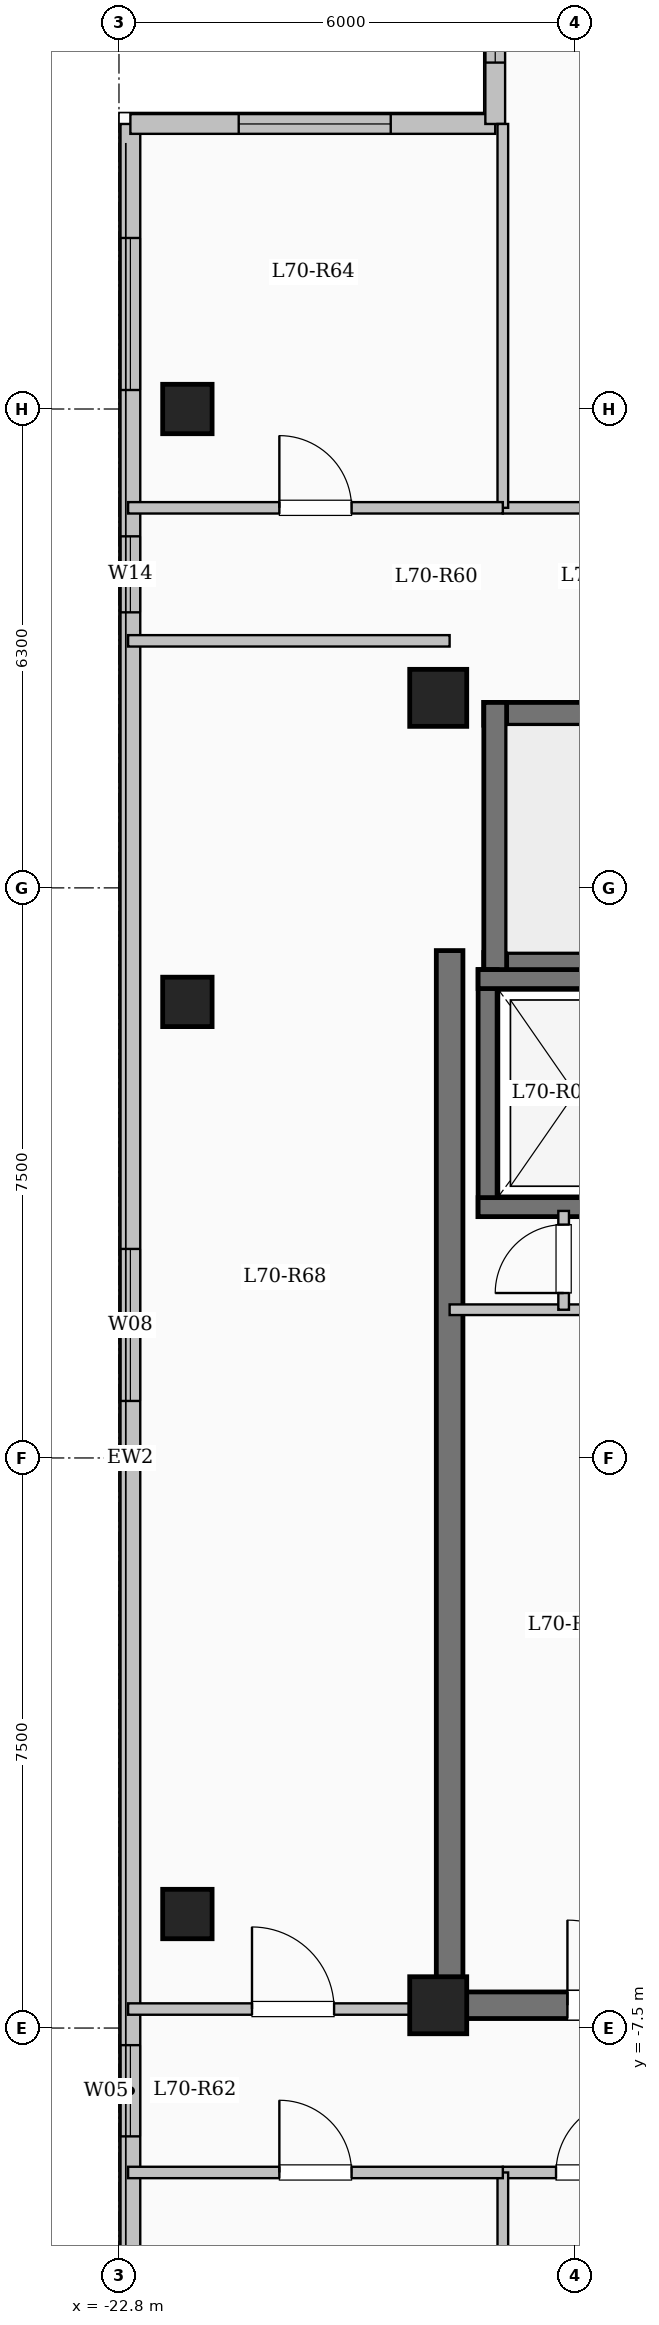
"""IFC4 building model, lengths in metres.
Left out: names, types, materials, properties, quantities, classifications, styles, units other than length and angle.
Written with IfcOpenShell. Run it as: python <this file> out.ifc"""

import sys

from ifc_helpers import new_model, si_unit, direction, frame, frame_2d, origin, origin_2d, place, context, subcontext, project, spatial, rectangle, extrude, element, fill, save


model = new_model("IFC4")
c1 = context("Model", 3, precision=1e-05, world=origin(), true_north=direction((0.0, 1.0)))
c2 = subcontext(c1, "Body", "Model", "MODEL_VIEW")
j1 = project(units=[si_unit("LENGTHUNIT", "METRE"), si_unit("PLANEANGLEUNIT", "RADIAN")], contexts=[c1])
p1 = place(None, origin())
s1 = spatial("IfcSite", under=j1, at=p1, CompositionType="ELEMENT")
p2 = place(p1, origin())
s2 = spatial("IfcBuilding", under=s1, at=p2, CompositionType="ELEMENT")
p3 = place(p2, frame((0.0, 0.0, 258.25)))
s3 = spatial("IfcBuildingStorey", under=s2, at=p3, CompositionType="ELEMENT", Elevation=258.25)
for number, where, z_axis, x_axis in (
    (1, (-18.6, -7.2, 0.0), (0.0, 0.0, 1.0), (1.0, 0.0, 0.0)),
    (2, (-18.6, 10.0, 0.0), (0.0, 0.0, 1.0), (1.0, 0.0, 0.0)),
):
    element("IfcColumn", number, at=place(p3, frame(where, z_axis=z_axis, x_axis=x_axis)), inside=s3, PredefinedType="COLUMN", context=c2, shape_type="SweptSolid", body=[
        extrude(rectangle(XDim=0.75, YDim=0.75, at=origin_2d()), origin(), (0.0, 0.0, 1.0), 3.35),
    ])
for number, where, z_axis, x_axis in (
    (3, (-21.9, -6.0, 0.0), (0.0, 0.0, 1.0), (1.0, 0.0, 0.0)),
    (4, (-21.9, 6.0, 0.0), (0.0, 0.0, 1.0), (1.0, 0.0, 0.0)),
    (5, (-21.9, 13.8, 0.0), (0.0, 0.0, 1.0), (1.0, 0.0, 0.0)),
):
    element("IfcColumn", number, at=place(p3, frame(where, z_axis=z_axis, x_axis=x_axis)), inside=s3, PredefinedType="COLUMN", context=c2, shape_type="SweptSolid", body=[
        extrude(rectangle(XDim=0.65, YDim=0.65, at=origin_2d()), origin(), (0.0, 0.0, 1.0), 3.35),
    ])
p4 = place(p3, frame((-22.65, -17.55, 0.0), z_axis=(0.0, 0.0, 1.0), x_axis=(0.0, 1.0, 0.0)))
e6 = element("IfcWall", 6, at=p4, inside=s3, PredefinedType="SOLIDWALL", context=c2, shape_type="SweptSolid", body=[
    extrude(rectangle(XDim=35.1, YDim=0.26, at=frame_2d((17.55, 0.0))), origin(), (0.0, 0.0, 1.0), 3.1),
])
p5 = place(p4, frame((2.975, 0.0, 0.9)))
e7 = element("IfcOpeningElement", 7, at=p5, cuts=e6, PredefinedType="OPENING", context=c2, shape_type="SweptSolid", body=[
    extrude(rectangle(XDim=2.2, YDim=1.75, at=frame_2d((1.1, 0.875))), frame((0.0, 0.14, 0.0), z_axis=(0.0, -1.0, 0.0), x_axis=(1.0, 0.0, 0.0)), (0.0, 0.0, 1.0), 0.28),
])
p6 = place(p4, frame((8.625, 0.0, 0.95)))
e8 = element("IfcOpeningElement", 8, at=p6, cuts=e6, PredefinedType="OPENING", context=c2, shape_type="SweptSolid", body=[
    extrude(rectangle(XDim=1.2, YDim=1.5, at=frame_2d((0.6, 0.75))), frame((0.0, 0.14, 0.0), z_axis=(0.0, -1.0, 0.0), x_axis=(1.0, 0.0, 0.0)), (0.0, 0.0, 1.0), 0.28),
])
p7 = place(p4, frame((18.3, 0.0, 0.9)))
e9 = element("IfcOpeningElement", 9, at=p7, cuts=e6, PredefinedType="OPENING", context=c2, shape_type="SweptSolid", body=[
    extrude(rectangle(XDim=2.0, YDim=1.7, at=frame_2d((1.0, 0.85))), frame((0.0, 0.14, 0.0), z_axis=(0.0, -1.0, 0.0), x_axis=(1.0, 0.0, 0.0)), (0.0, 0.0, 1.0), 0.28),
])
p8 = place(p4, frame((28.675, 0.0, 0.95)))
e10 = element("IfcOpeningElement", 10, at=p8, cuts=e6, PredefinedType="OPENING", context=c2, shape_type="SweptSolid", body=[
    extrude(rectangle(XDim=1.0, YDim=1.5, at=frame_2d((0.5, 0.75))), frame((0.0, 0.14, 0.0), z_axis=(0.0, -1.0, 0.0), x_axis=(1.0, 0.0, 0.0)), (0.0, 0.0, 1.0), 0.28),
])
p9 = place(p4, frame((31.6, 0.0, 0.9)))
e11 = element("IfcOpeningElement", 11, at=p9, cuts=e6, PredefinedType="OPENING", context=c2, shape_type="SweptSolid", body=[
    extrude(rectangle(XDim=2.0, YDim=1.7, at=frame_2d((1.0, 0.85))), frame((0.0, 0.14, 0.0), z_axis=(0.0, -1.0, 0.0), x_axis=(1.0, 0.0, 0.0)), (0.0, 0.0, 1.0), 0.28),
])
p10 = place(p3, frame((-22.65, 17.55, 0.0), z_axis=(0.0, 0.0, 1.0), x_axis=(1.0, 0.0, 0.0)))
e12 = element("IfcWall", 12, at=p10, inside=s3, PredefinedType="SOLIDWALL", context=c2, shape_type="SweptSolid", body=[
    extrude(rectangle(XDim=4.8, YDim=0.26, at=frame_2d((2.4, 0.0))), origin(), (0.0, 0.0, 1.0), 3.1),
])
p11 = place(p10, frame((1.425, 0.0, 0.9)))
e13 = element("IfcOpeningElement", 13, at=p11, cuts=e12, PredefinedType="OPENING", context=c2, shape_type="SweptSolid", body=[
    extrude(rectangle(XDim=2.0, YDim=1.7, at=frame_2d((1.0, 0.85))), frame((0.0, 0.14, 0.0), z_axis=(0.0, -1.0, 0.0), x_axis=(1.0, 0.0, 0.0)), (0.0, 0.0, 1.0), 0.28),
])
p12 = place(p3, frame((-17.85, 17.55, 0.0), z_axis=(0.0, 0.0, 1.0), x_axis=(0.0, 1.0, 0.0)))
e14 = element("IfcWall", 14, at=p12, inside=s3, PredefinedType="SOLIDWALL", context=c2, shape_type="SweptSolid", body=[
    extrude(rectangle(XDim=3.3, YDim=0.26, at=frame_2d((1.65, 0.0))), origin(), (0.0, 0.0, 1.0), 3.1),
])
p13 = place(p12, frame((0.808, 0.0, 0.9)))
e15 = element("IfcOpeningElement", 15, at=p13, cuts=e14, PredefinedType="OPENING", context=c2, shape_type="SweptSolid", body=[
    extrude(rectangle(XDim=1.65, YDim=1.6, at=frame_2d((0.825, 0.8))), frame((0.0, 0.14, 0.0), z_axis=(0.0, -1.0, 0.0), x_axis=(1.0, 0.0, 0.0)), (0.0, 0.0, 1.0), 0.28),
])
p14 = place(p3, frame((-18.0, 9.79, 0.0), z_axis=(0.0, 0.0, 1.0), x_axis=(1.0, 0.0, 0.0)))
e16 = element("IfcWall", 16, at=p14, inside=s3, PredefinedType="SHEAR", context=c2, shape_type="SweptSolid", body=[
    extrude(rectangle(XDim=8.0, YDim=0.3, at=frame_2d((4.0, 0.0))), origin(), (0.0, 0.0, 1.0), 3.35),
])
p15 = place(p3, frame((-18.0, 6.5, 0.0), z_axis=(0.0, 0.0, 1.0), x_axis=(1.0, 0.0, 0.0)))
e17 = element("IfcWall", 17, at=p15, inside=s3, PredefinedType="SHEAR", context=c2, shape_type="SweptSolid", body=[
    extrude(rectangle(XDim=8.0, YDim=0.3, at=frame_2d((4.0, 0.0))), origin(), (0.0, 0.0, 1.0), 3.35),
])
p16 = place(p15, frame((6.45, 0.0, 0.0)))
e18 = element("IfcOpeningElement", 18, at=p16, cuts=e17, PredefinedType="OPENING", context=c2, shape_type="SweptSolid", body=[
    extrude(rectangle(XDim=1.0, YDim=2.15, at=frame_2d((0.5, 1.075))), frame((0.0, 0.16, 0.0), z_axis=(0.0, -1.0, 0.0), x_axis=(1.0, 0.0, 0.0)), (0.0, 0.0, 1.0), 0.32),
])
p17 = place(p3, frame((-17.85, 6.35, 0.0), z_axis=(0.0, 0.0, 1.0), x_axis=(0.0, 1.0, 0.0)))
e19 = element("IfcWall", 19, at=p17, inside=s3, PredefinedType="SHEAR", context=c2, shape_type="SweptSolid", body=[
    extrude(rectangle(XDim=3.59, YDim=0.3, at=frame_2d((1.795, 0.0))), origin(), (0.0, 0.0, 1.0), 3.35),
])
p18 = place(p3, frame((-17.95, 3.175, 0.0), z_axis=(0.0, 0.0, 1.0), x_axis=(0.0, 1.0, 0.0)))
e20 = element("IfcWall", 20, at=p18, inside=s3, PredefinedType="SHEAR", context=c2, shape_type="SweptSolid", body=[
    extrude(rectangle(XDim=3.25, YDim=0.25, at=frame_2d((1.625, 0.0))), origin(), (0.0, 0.0, 1.0), 3.35),
])
for number, where, z_axis, x_axis in (
    (21, (-18.075, 3.3, 0.0), (0.0, 0.0, 1.0), (1.0, 0.0, 0.0)),
    (22, (-18.075, 6.3, 0.0), (0.0, 0.0, 1.0), (1.0, 0.0, 0.0)),
):
    element("IfcWall", number, at=place(p3, frame(where, z_axis=z_axis, x_axis=x_axis)), inside=s3, PredefinedType="SHEAR", context=c2, shape_type="SweptSolid", body=[
        extrude(rectangle(XDim=2.55, YDim=0.25, at=frame_2d((1.275, 0.0))), origin(), (0.0, 0.0, 1.0), 3.35),
    ])
p19 = place(p3, frame((-18.45, -7.375, 0.0), z_axis=(0.0, 0.0, 1.0), x_axis=(0.0, 1.0, 0.0)))
e23 = element("IfcWall", 23, at=p19, inside=s3, PredefinedType="SHEAR", context=c2, shape_type="SweptSolid", body=[
    extrude(rectangle(XDim=14.05, YDim=0.35, at=frame_2d((7.025, 0.0))), origin(), (0.0, 0.0, 1.0), 3.35),
])
p20 = place(p3, frame((-18.625, -7.2, 0.0), z_axis=(0.0, 0.0, 1.0), x_axis=(1.0, 0.0, 0.0)))
e24 = element("IfcWall", 24, at=p20, inside=s3, PredefinedType="SHEAR", context=c2, shape_type="SweptSolid", body=[
    extrude(rectangle(XDim=8.55, YDim=0.35, at=frame_2d((4.275, 0.0))), origin(), (0.0, 0.0, 1.0), 3.35),
])
p21 = place(p20, frame((1.725, 0.0, 0.0)))
e25 = element("IfcOpeningElement", 25, at=p21, cuts=e24, PredefinedType="OPENING", context=c2, shape_type="SweptSolid", body=[
    extrude(rectangle(XDim=1.12, YDim=2.15, at=frame_2d((0.56, 1.075))), frame((0.0, 0.185, 0.0), z_axis=(0.0, -1.0, 0.0), x_axis=(1.0, 0.0, 0.0)), (0.0, 0.0, 1.0), 0.37),
])
p22 = place(p3, frame((-18.45, 1.95, 0.0), z_axis=(0.0, 0.0, 1.0), x_axis=(1.0, 0.0, 0.0)))
e26 = element("IfcWall", 26, at=p22, inside=s3, PredefinedType="PARTITIONING", context=c2, shape_type="SweptSolid", body=[
    extrude(rectangle(XDim=3.15, YDim=0.14, at=frame_2d((1.575, 0.0))), origin(), (0.0, 0.0, 1.0), 3.1),
])
p23 = place(p22, frame((1.9, 0.0, 0.0)))
e27 = element("IfcOpeningElement", 27, at=p23, cuts=e26, PredefinedType="OPENING", context=c2, shape_type="SweptSolid", body=[
    extrude(rectangle(XDim=0.9, YDim=2.08, at=frame_2d((0.45, 1.04))), frame((0.0, 0.08, 0.0), z_axis=(0.0, -1.0, 0.0), x_axis=(1.0, 0.0, 0.0)), (0.0, 0.0, 1.0), 0.16),
])
p24 = place(p3, frame((-16.95, 1.95, 0.0), z_axis=(0.0, 0.0, 1.0), x_axis=(0.0, 1.0, 0.0)))
e28 = element("IfcWall", 28, at=p24, inside=s3, PredefinedType="PARTITIONING", context=c2, shape_type="SweptSolid", body=[
    extrude(rectangle(XDim=1.3, YDim=0.14, at=frame_2d((0.65, 0.0))), origin(), (0.0, 0.0, 1.0), 3.1),
])
p25 = place(p24, frame((0.22, 0.0, 0.0)))
e29 = element("IfcOpeningElement", 29, at=p25, cuts=e28, PredefinedType="OPENING", context=c2, shape_type="SweptSolid", body=[
    extrude(rectangle(XDim=0.9, YDim=2.08, at=frame_2d((0.45, 1.04))), frame((0.0, 0.08, 0.0), z_axis=(0.0, -1.0, 0.0), x_axis=(1.0, 0.0, 0.0)), (0.0, 0.0, 1.0), 0.16),
])
p26 = place(p3, frame((-17.75, 12.5, 0.0), z_axis=(0.0, 0.0, 1.0), x_axis=(1.0, 0.0, 0.0)))
e30 = element("IfcWall", 30, at=p26, inside=s3, PredefinedType="PARTITIONING", context=c2, shape_type="SweptSolid", body=[
    extrude(rectangle(XDim=13.9, YDim=0.15, at=frame_2d((6.95, 0.0))), origin(), (0.0, 0.0, 1.0), 3.1),
])
p27 = place(p26, frame((1.968, 0.0, 0.0)))
e31 = element("IfcOpeningElement", 31, at=p27, cuts=e30, PredefinedType="OPENING", context=c2, shape_type="SweptSolid", body=[
    extrude(rectangle(XDim=0.95, YDim=2.15, at=frame_2d((0.475, 1.075))), frame((0.0, 0.085, 0.0), z_axis=(0.0, -1.0, 0.0), x_axis=(1.0, 0.0, 0.0)), (0.0, 0.0, 1.0), 0.17),
])
p28 = place(p26, frame((6.944, 0.0, 0.0)))
e32 = element("IfcOpeningElement", 32, at=p28, cuts=e30, PredefinedType="OPENING", context=c2, shape_type="SweptSolid", body=[
    extrude(rectangle(XDim=0.95, YDim=2.15, at=frame_2d((0.475, 1.075))), frame((0.0, 0.085, 0.0), z_axis=(0.0, -1.0, 0.0), x_axis=(1.0, 0.0, 0.0)), (0.0, 0.0, 1.0), 0.17),
])
p29 = place(p26, frame((11.371, 0.0, 0.0)))
e33 = element("IfcOpeningElement", 33, at=p29, cuts=e30, PredefinedType="OPENING", context=c2, shape_type="SweptSolid", body=[
    extrude(rectangle(XDim=0.95, YDim=2.15, at=frame_2d((0.475, 1.075))), frame((0.0, 0.085, 0.0), z_axis=(0.0, -1.0, 0.0), x_axis=(1.0, 0.0, 0.0)), (0.0, 0.0, 1.0), 0.17),
])
p30 = place(p3, frame((-17.75, -9.4, 0.0), z_axis=(0.0, 0.0, 1.0), x_axis=(1.0, 0.0, 0.0)))
e34 = element("IfcWall", 34, at=p30, inside=s3, PredefinedType="PARTITIONING", context=c2, shape_type="SweptSolid", body=[
    extrude(rectangle(XDim=9.2, YDim=0.15, at=frame_2d((4.6, 0.0))), origin(), (0.0, 0.0, 1.0), 3.1),
])
p31 = place(p30, frame((0.7, 0.0, 0.0)))
e35 = element("IfcOpeningElement", 35, at=p31, cuts=e34, PredefinedType="OPENING", context=c2, shape_type="SweptSolid", body=[
    extrude(rectangle(XDim=0.96, YDim=2.15, at=frame_2d((0.48, 1.075))), frame((0.0, 0.085, 0.0), z_axis=(0.0, -1.0, 0.0), x_axis=(1.0, 0.0, 0.0)), (0.0, 0.0, 1.0), 0.17),
])
p32 = place(p30, frame((5.275, 0.0, 0.0)))
e36 = element("IfcOpeningElement", 36, at=p32, cuts=e34, PredefinedType="OPENING", context=c2, shape_type="SweptSolid", body=[
    extrude(rectangle(XDim=0.96, YDim=2.15, at=frame_2d((0.48, 1.075))), frame((0.0, 0.085, 0.0), z_axis=(0.0, -1.0, 0.0), x_axis=(1.0, 0.0, 0.0)), (0.0, 0.0, 1.0), 0.17),
])
p33 = place(p3, frame((-22.68, -7.25, 0.0), z_axis=(0.0, 0.0, 1.0), x_axis=(1.0, 0.0, 0.0)))
e37 = element("IfcWall", 37, at=p33, inside=s3, PredefinedType="PARTITIONING", context=c2, shape_type="SweptSolid", body=[
    extrude(rectangle(XDim=4.23, YDim=0.15, at=frame_2d((2.115, 0.0))), origin(), (0.0, 0.0, 1.0), 3.1),
])
p34 = place(p33, frame((1.63, 0.0, 0.0)))
e38 = element("IfcOpeningElement", 38, at=p34, cuts=e37, PredefinedType="OPENING", context=c2, shape_type="SweptSolid", body=[
    extrude(rectangle(XDim=1.08, YDim=2.15, at=frame_2d((0.54, 1.075))), frame((0.0, 0.085, 0.0), z_axis=(0.0, -1.0, 0.0), x_axis=(1.0, 0.0, 0.0)), (0.0, 0.0, 1.0), 0.17),
])
p35 = place(p3, frame((-22.68, 10.75, 0.0), z_axis=(0.0, 0.0, 1.0), x_axis=(1.0, 0.0, 0.0)))
e39 = element("IfcWall", 39, at=p35, inside=s3, PredefinedType="PARTITIONING", context=c2, shape_type="SweptSolid", body=[
    extrude(rectangle(XDim=4.23, YDim=0.15, at=frame_2d((2.115, 0.0))), origin(), (0.0, 0.0, 1.0), 3.1),
])
p36 = place(p3, frame((-17.75, -17.55, 0.0), z_axis=(0.0, 0.0, 1.0), x_axis=(0.0, 1.0, 0.0)))
e40 = element("IfcWall", 40, at=p36, inside=s3, PredefinedType="PARTITIONING", context=c2, shape_type="SweptSolid", body=[
    extrude(rectangle(XDim=8.15, YDim=0.14, at=frame_2d((4.075, 0.0))), origin(), (0.0, 0.0, 1.0), 3.1),
])
p37 = place(p3, frame((-17.75, 12.5, 0.0), z_axis=(0.0, 0.0, 1.0), x_axis=(0.0, 1.0, 0.0)))
e41 = element("IfcWall", 41, at=p37, inside=s3, PredefinedType="PARTITIONING", context=c2, shape_type="SweptSolid", body=[
    extrude(rectangle(XDim=5.05, YDim=0.14, at=frame_2d((2.525, 0.0))), origin(), (0.0, 0.0, 1.0), 3.1),
])
p38 = place(p3, frame((-22.68, 12.5, 0.0), z_axis=(0.0, 0.0, 1.0), x_axis=(1.0, 0.0, 0.0)))
e42 = element("IfcWall", 42, at=p38, inside=s3, PredefinedType="PARTITIONING", context=c2, shape_type="SweptSolid", body=[
    extrude(rectangle(XDim=4.93, YDim=0.15, at=frame_2d((2.465, 0.0))), origin(), (0.0, 0.0, 1.0), 3.1),
])
p39 = place(p38, frame((1.99, 0.0, 0.0)))
e43 = element("IfcOpeningElement", 43, at=p39, cuts=e42, PredefinedType="OPENING", context=c2, shape_type="SweptSolid", body=[
    extrude(rectangle(XDim=0.95, YDim=2.15, at=frame_2d((0.475, 1.075))), frame((0.0, 0.085, 0.0), z_axis=(0.0, -1.0, 0.0), x_axis=(1.0, 0.0, 0.0)), (0.0, 0.0, 1.0), 0.17),
])
p40 = place(p3, frame((-22.68, -9.4, 0.0), z_axis=(0.0, 0.0, 1.0), x_axis=(1.0, 0.0, 0.0)))
e44 = element("IfcWall", 44, at=p40, inside=s3, PredefinedType="PARTITIONING", context=c2, shape_type="SweptSolid", body=[
    extrude(rectangle(XDim=4.93, YDim=0.15, at=frame_2d((2.465, 0.0))), origin(), (0.0, 0.0, 1.0), 3.1),
])
p41 = place(p40, frame((1.99, 0.0, 0.0)))
e45 = element("IfcOpeningElement", 45, at=p41, cuts=e44, PredefinedType="OPENING", context=c2, shape_type="SweptSolid", body=[
    extrude(rectangle(XDim=0.95, YDim=2.15, at=frame_2d((0.475, 1.075))), frame((0.0, 0.085, 0.0), z_axis=(0.0, -1.0, 0.0), x_axis=(1.0, 0.0, 0.0)), (0.0, 0.0, 1.0), 0.17),
])
p42 = place(p6, origin())
e46 = element("IfcWindow", 46, at=p42, inside=s3, PartitioningType="SINGLE_PANEL", PredefinedType="WINDOW", context=c2, shape_type="SweptSolid", body=[
    extrude(rectangle(XDim=1.2, YDim=1.5, at=frame_2d((0.6, 0.75))), frame((0.0, 0.03, 0.0), z_axis=(0.0, -1.0, 0.0), x_axis=(1.0, 0.0, 0.0)), (0.0, 0.0, 1.0), 0.06),
])
fill(e8, e46)
p43 = place(p7, origin())
e47 = element("IfcWindow", 47, at=p43, inside=s3, PartitioningType="SINGLE_PANEL", PredefinedType="WINDOW", context=c2, shape_type="SweptSolid", body=[
    extrude(rectangle(XDim=2.0, YDim=1.7, at=frame_2d((1.0, 0.85))), frame((0.0, 0.03, 0.0), z_axis=(0.0, -1.0, 0.0), x_axis=(1.0, 0.0, 0.0)), (0.0, 0.0, 1.0), 0.06),
])
fill(e9, e47)
p44 = place(p8, origin())
e48 = element("IfcWindow", 48, at=p44, inside=s3, PartitioningType="SINGLE_PANEL", PredefinedType="WINDOW", context=c2, shape_type="SweptSolid", body=[
    extrude(rectangle(XDim=1.0, YDim=1.5, at=frame_2d((0.5, 0.75))), frame((0.0, 0.03, 0.0), z_axis=(0.0, -1.0, 0.0), x_axis=(1.0, 0.0, 0.0)), (0.0, 0.0, 1.0), 0.06),
])
fill(e10, e48)
p45 = place(p9, origin())
e49 = element("IfcWindow", 49, at=p45, inside=s3, PartitioningType="SINGLE_PANEL", PredefinedType="WINDOW", context=c2, shape_type="SweptSolid", body=[
    extrude(rectangle(XDim=2.0, YDim=1.7, at=frame_2d((1.0, 0.85))), frame((0.0, 0.03, 0.0), z_axis=(0.0, -1.0, 0.0), x_axis=(1.0, 0.0, 0.0)), (0.0, 0.0, 1.0), 0.06),
])
fill(e11, e49)
p46 = place(p11, origin())
e50 = element("IfcWindow", 50, at=p46, inside=s3, PartitioningType="SINGLE_PANEL", PredefinedType="WINDOW", context=c2, shape_type="SweptSolid", body=[
    extrude(rectangle(XDim=2.0, YDim=1.7, at=frame_2d((1.0, 0.85))), frame((0.0, 0.03, 0.0), z_axis=(0.0, -1.0, 0.0), x_axis=(1.0, 0.0, 0.0)), (0.0, 0.0, 1.0), 0.06),
])
fill(e13, e50)
p47 = place(p13, origin())
e51 = element("IfcWindow", 51, at=p47, inside=s3, PartitioningType="SINGLE_PANEL", PredefinedType="WINDOW", context=c2, shape_type="SweptSolid", body=[
    extrude(rectangle(XDim=1.65, YDim=1.6, at=frame_2d((0.825, 0.8))), frame((0.0, 0.03, 0.0), z_axis=(0.0, -1.0, 0.0), x_axis=(1.0, 0.0, 0.0)), (0.0, 0.0, 1.0), 0.06),
])
fill(e15, e51)
p48 = place(p21, origin())
e52 = element("IfcDoor", 52, at=p48, inside=s3, OperationType="SINGLE_SWING_LEFT", PredefinedType="DOOR", context=c2, shape_type="SweptSolid", body=[
    extrude(rectangle(XDim=1.12, YDim=2.15, at=frame_2d((0.56, 1.075))), frame((0.0, 0.025, 0.0), z_axis=(0.0, -1.0, 0.0), x_axis=(1.0, 0.0, 0.0)), (0.0, 0.0, 1.0), 0.05),
])
fill(e25, e52)
p49 = place(p25, origin())
e53 = element("IfcDoor", 53, at=p49, inside=s3, OperationType="SINGLE_SWING_LEFT", PredefinedType="DOOR", context=c2, shape_type="SweptSolid", body=[
    extrude(rectangle(XDim=0.9, YDim=2.08, at=frame_2d((0.45, 1.04))), frame((0.0, 0.025, 0.0), z_axis=(0.0, -1.0, 0.0), x_axis=(1.0, 0.0, 0.0)), (0.0, 0.0, 1.0), 0.05),
])
fill(e29, e53)
p50 = place(p31, origin())
e54 = element("IfcDoor", 54, at=p50, inside=s3, OperationType="SINGLE_SWING_RIGHT", PredefinedType="DOOR", context=c2, shape_type="SweptSolid", body=[
    extrude(rectangle(XDim=0.96, YDim=2.15, at=frame_2d((0.48, 1.075))), frame((0.0, 0.025, 0.0), z_axis=(0.0, -1.0, 0.0), x_axis=(1.0, 0.0, 0.0)), (0.0, 0.0, 1.0), 0.05),
])
fill(e35, e54)
p51 = place(p39, origin())
e55 = element("IfcDoor", 55, at=p51, inside=s3, OperationType="SINGLE_SWING_LEFT", PredefinedType="DOOR", context=c2, shape_type="SweptSolid", body=[
    extrude(rectangle(XDim=0.95, YDim=2.15, at=frame_2d((0.475, 1.075))), frame((0.0, 0.025, 0.0), z_axis=(0.0, -1.0, 0.0), x_axis=(1.0, 0.0, 0.0)), (0.0, 0.0, 1.0), 0.05),
])
fill(e43, e55)
p52 = place(p41, origin())
e56 = element("IfcDoor", 56, at=p52, inside=s3, OperationType="SINGLE_SWING_LEFT", PredefinedType="DOOR", context=c2, shape_type="SweptSolid", body=[
    extrude(rectangle(XDim=0.95, YDim=2.15, at=frame_2d((0.475, 1.075))), frame((0.0, 0.025, 0.0), z_axis=(0.0, -1.0, 0.0), x_axis=(1.0, 0.0, 0.0)), (0.0, 0.0, 1.0), 0.05),
])
fill(e45, e56)
p53 = place(p34, origin())
e57 = element("IfcDoor", 57, at=p53, inside=s3, OperationType="SINGLE_SWING_LEFT", PredefinedType="DOOR", context=c2, shape_type="SweptSolid", body=[
    extrude(rectangle(XDim=1.08, YDim=2.15, at=frame_2d((0.54, 1.075))), frame((0.0, 0.025, 0.0), z_axis=(0.0, -1.0, 0.0), x_axis=(1.0, 0.0, 0.0)), (0.0, 0.0, 1.0), 0.05),
])
fill(e38, e57)
save(model, sys.argv[1])
